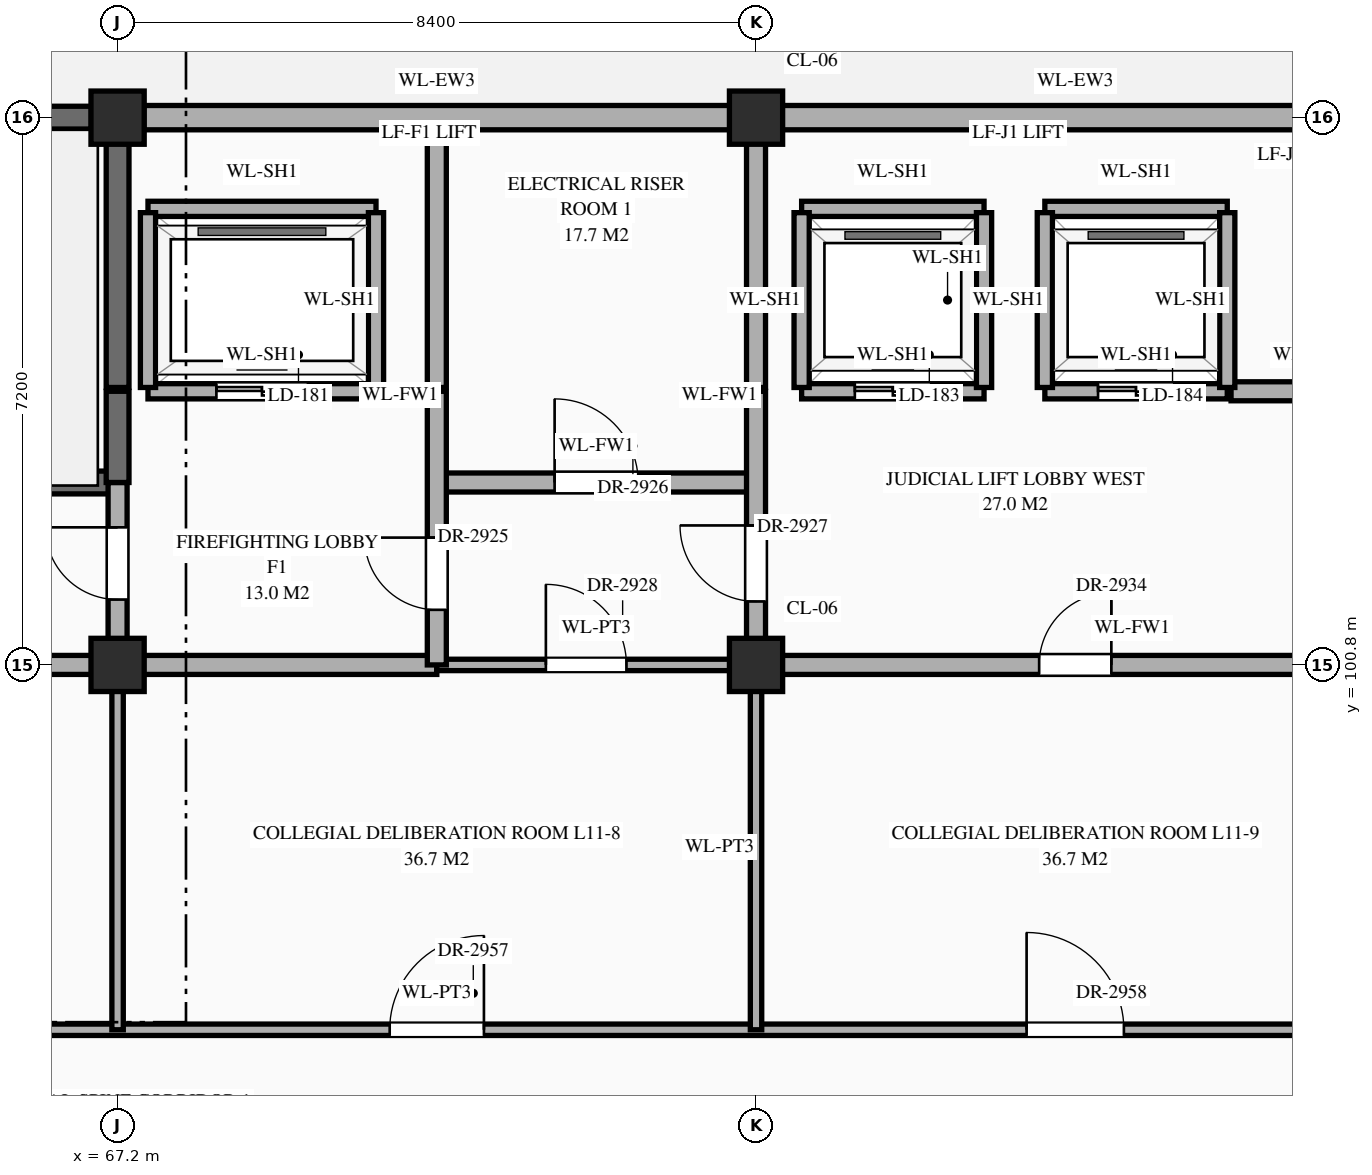
"""IFC4 building model, lengths in metres.
Left out: names, types, materials, properties, quantities, classifications, styles, units other than length and angle.
Written with IfcOpenShell. Run it as: python <this file> out.ifc"""

import sys

from ifc_helpers import new_model, si_unit, direction, frame, frame_2d, origin, origin_2d, place, context, subcontext, project, spatial, rectangle, extrude, element, fill, save


model = new_model("IFC4")
c1 = context("Model", 3, precision=1e-05, world=origin(), true_north=direction((0.0, 1.0)))
c2 = subcontext(c1, "Body", "Model", "MODEL_VIEW")
j1 = project(units=[si_unit("LENGTHUNIT", "METRE"), si_unit("PLANEANGLEUNIT", "RADIAN")], contexts=[c1])
p1 = place(None, origin())
s1 = spatial("IfcSite", under=j1, at=p1, CompositionType="ELEMENT")
p2 = place(p1, origin())
s2 = spatial("IfcBuilding", under=s1, at=p2, CompositionType="ELEMENT")
p3 = place(p2, frame((0.0, 0.0, 47.7)))
s3 = spatial("IfcBuildingStorey", under=s2, at=p3, CompositionType="ELEMENT", Elevation=47.7)
for number, where, z_axis, x_axis in (
    (1, (67.2, 100.8, 0.0), (0.0, 0.0, 1.0), (1.0, 0.0, 0.0)),
    (2, (67.2, 108.0, 0.0), (0.0, 0.0, 1.0), (1.0, 0.0, 0.0)),
    (3, (75.6, 100.8, 0.0), (0.0, 0.0, 1.0), (1.0, 0.0, 0.0)),
    (4, (75.6, 108.0, 0.0), (0.0, 0.0, 1.0), (1.0, 0.0, 0.0)),
):
    element("IfcColumn", number, at=place(p3, frame(where, z_axis=z_axis, x_axis=x_axis)), inside=s3, PredefinedType="COLUMN", context=c2, shape_type="SweptSolid", body=[
        extrude(rectangle(XDim=0.7, YDim=0.7, at=origin_2d()), origin(), (0.0, 0.0, 1.0), 4.2),
    ])
p4 = place(p3, frame((59.145, 108.0, 0.0), z_axis=(0.0, 0.0, 1.0), x_axis=(1.0, 0.0, 0.0)))
e5 = element("IfcWall", 5, at=p4, inside=s3, PredefinedType="SHEAR", context=c2, shape_type="SweptSolid", body=[
    extrude(rectangle(XDim=7.71, YDim=0.3, at=frame_2d((3.855, 0.0))), origin(), (0.0, 0.0, 1.0), 3.96),
])
for number, where, z_axis, x_axis in (
    (6, (67.545, 108.0, 0.0), (0.0, 0.0, 1.0), (1.0, 0.0, 0.0)),
    (7, (75.945, 108.0, 0.0), (0.0, 0.0, 1.0), (1.0, 0.0, 0.0)),
):
    element("IfcWall", number, at=place(p3, frame(where, z_axis=z_axis, x_axis=x_axis)), inside=s3, PredefinedType="STANDARD", context=c2, shape_type="SweptSolid", body=[
        extrude(rectangle(XDim=7.71, YDim=0.32, at=frame_2d((3.855, 0.0))), origin(), (0.0, 0.0, 1.0), 3.31),
    ])
p5 = place(p3, frame((58.8, 96.0, 0.0), z_axis=(0.0, 0.0, 1.0), x_axis=(1.0, 0.0, 0.0)))
e8 = element("IfcWall", 8, at=p5, inside=s3, PredefinedType="STANDARD", context=c2, shape_type="SweptSolid", body=[
    extrude(rectangle(XDim=25.2, YDim=0.15, at=frame_2d((12.6, 0.0))), origin(), (0.0, 0.0, 1.0), 3.96),
])
p6 = place(p5, frame((3.6, 0.0, 0.0)))
e9 = element("IfcOpeningElement", 9, at=p6, cuts=e8, PredefinedType="OPENING", context=c2, shape_type="SweptSolid", body=[
    extrude(rectangle(XDim=1.2, YDim=2.35, at=frame_2d((0.6, 1.175))), frame((0.0, 0.087, 0.0), z_axis=(0.0, -1.0, 0.0), x_axis=(1.0, 0.0, 0.0)), (0.0, 0.0, 1.0), 0.174),
])
p7 = place(p5, frame((11.98, 0.0, 0.0)))
e10 = element("IfcOpeningElement", 10, at=p7, cuts=e8, PredefinedType="OPENING", context=c2, shape_type="SweptSolid", body=[
    extrude(rectangle(XDim=1.24, YDim=2.3, at=frame_2d((0.62, 1.15))), frame((0.0, 0.087, 0.0), z_axis=(0.0, -1.0, 0.0), x_axis=(1.0, 0.0, 0.0)), (0.0, 0.0, 1.0), 0.174),
])
p8 = place(p5, frame((20.36, 0.0, 0.0)))
e11 = element("IfcOpeningElement", 11, at=p8, cuts=e8, PredefinedType="OPENING", context=c2, shape_type="SweptSolid", body=[
    extrude(rectangle(XDim=1.28, YDim=2.35, at=frame_2d((0.64, 1.175))), frame((0.0, 0.087, 0.0), z_axis=(0.0, -1.0, 0.0), x_axis=(1.0, 0.0, 0.0)), (0.0, 0.0, 1.0), 0.174),
])
p9 = place(p3, frame((58.8, 100.8, 0.0), z_axis=(0.0, 0.0, 1.0), x_axis=(1.0, 0.0, 0.0)))
e12 = element("IfcWall", 12, at=p9, inside=s3, PredefinedType="STANDARD", context=c2, shape_type="SweptSolid", body=[
    extrude(rectangle(XDim=12.6, YDim=0.25, at=frame_2d((6.3, 0.0))), origin(), (0.0, 0.0, 1.0), 3.11),
])
p10 = place(p9, frame((3.7, 0.0, 0.0)))
e13 = element("IfcOpeningElement", 13, at=p10, cuts=e12, PredefinedType="OPENING", context=c2, shape_type="SweptSolid", body=[
    extrude(rectangle(XDim=1.0, YDim=2.2, at=frame_2d((0.5, 1.1))), frame((0.0, 0.137, 0.0), z_axis=(0.0, -1.0, 0.0), x_axis=(1.0, 0.0, 0.0)), (0.0, 0.0, 1.0), 0.274),
])
p11 = place(p3, frame((71.4, 100.8, 0.0), z_axis=(0.0, 0.0, 1.0), x_axis=(1.0, 0.0, 0.0)))
e14 = element("IfcWall", 14, at=p11, inside=s3, PredefinedType="STANDARD", context=c2, shape_type="SweptSolid", body=[
    extrude(rectangle(XDim=4.2, YDim=0.15, at=frame_2d((2.1, 0.0))), origin(), (0.0, 0.0, 1.0), 3.11),
])
p12 = place(p11, frame((1.435, 0.0, 0.0)))
e15 = element("IfcOpeningElement", 15, at=p12, cuts=e14, PredefinedType="OPENING", context=c2, shape_type="SweptSolid", body=[
    extrude(rectangle(XDim=1.06, YDim=2.4, at=frame_2d((0.53, 1.2))), frame((0.0, 0.087, 0.0), z_axis=(0.0, -1.0, 0.0), x_axis=(1.0, 0.0, 0.0)), (0.0, 0.0, 1.0), 0.174),
])
p13 = place(p3, frame((75.6, 100.8, 0.0), z_axis=(0.0, 0.0, 1.0), x_axis=(1.0, 0.0, 0.0)))
e16 = element("IfcWall", 16, at=p13, inside=s3, PredefinedType="STANDARD", context=c2, shape_type="SweptSolid", body=[
    extrude(rectangle(XDim=16.8, YDim=0.25, at=frame_2d((8.4, 0.0))), origin(), (0.0, 0.0, 1.0), 3.11),
])
p14 = place(p13, frame((3.725, 0.0, 0.0)))
e17 = element("IfcOpeningElement", 17, at=p14, cuts=e16, PredefinedType="OPENING", context=c2, shape_type="SweptSolid", body=[
    extrude(rectangle(XDim=0.95, YDim=2.15, at=frame_2d((0.475, 1.075))), frame((0.0, 0.137, 0.0), z_axis=(0.0, -1.0, 0.0), x_axis=(1.0, 0.0, 0.0)), (0.0, 0.0, 1.0), 0.274),
])
p15 = place(p13, frame((9.685, 0.0, 0.0)))
e18 = element("IfcOpeningElement", 18, at=p15, cuts=e16, PredefinedType="OPENING", context=c2, shape_type="SweptSolid", body=[
    extrude(rectangle(XDim=1.1, YDim=2.2, at=frame_2d((0.55, 1.1))), frame((0.0, 0.137, 0.0), z_axis=(0.0, -1.0, 0.0), x_axis=(1.0, 0.0, 0.0)), (0.0, 0.0, 1.0), 0.274),
])
p16 = place(p13, frame((12.5, 0.0, 0.0)))
e19 = element("IfcOpeningElement", 19, at=p16, cuts=e16, PredefinedType="OPENING", context=c2, shape_type="SweptSolid", body=[
    extrude(rectangle(XDim=1.0, YDim=2.2, at=frame_2d((0.5, 1.1))), frame((0.0, 0.137, 0.0), z_axis=(0.0, -1.0, 0.0), x_axis=(1.0, 0.0, 0.0)), (0.0, 0.0, 1.0), 0.274),
])
p17 = place(p13, frame((14.89, 0.0, 0.0)))
e20 = element("IfcOpeningElement", 20, at=p17, cuts=e16, PredefinedType="OPENING", context=c2, shape_type="SweptSolid", body=[
    extrude(rectangle(XDim=0.95, YDim=2.15, at=frame_2d((0.475, 1.075))), frame((0.0, 0.137, 0.0), z_axis=(0.0, -1.0, 0.0), x_axis=(1.0, 0.0, 0.0)), (0.0, 0.0, 1.0), 0.274),
])
p18 = place(p3, frame((58.8, 103.2, 0.0), z_axis=(0.0, 0.0, 1.0), x_axis=(1.0, 0.0, 0.0)))
e21 = element("IfcWall", 21, at=p18, inside=s3, PredefinedType="SHEAR", context=c2, shape_type="SweptSolid", body=[
    extrude(rectangle(XDim=8.4, YDim=0.3, at=frame_2d((4.2, 0.0))), origin(), (0.0, 0.0, 1.0), 3.96),
])
p19 = place(p18, frame((0.65, 0.0, 0.0)))
e22 = element("IfcOpeningElement", 22, at=p19, cuts=e21, PredefinedType="OPENING", context=c2, shape_type="SweptSolid", body=[
    extrude(rectangle(XDim=1.1, YDim=2.2, at=frame_2d((0.55, 1.1))), frame((0.0, 0.162, 0.0), z_axis=(0.0, -1.0, 0.0), x_axis=(1.0, 0.0, 0.0)), (0.0, 0.0, 1.0), 0.324),
])
p20 = place(p3, frame((71.4, 103.2, 0.0), z_axis=(0.0, 0.0, 1.0), x_axis=(1.0, 0.0, 0.0)))
e23 = element("IfcWall", 23, at=p20, inside=s3, PredefinedType="STANDARD", context=c2, shape_type="SweptSolid", body=[
    extrude(rectangle(XDim=4.2, YDim=0.25, at=frame_2d((2.1, 0.0))), origin(), (0.0, 0.0, 1.0), 3.96),
])
p21 = place(p20, frame((1.55, 0.0, 0.0)))
e24 = element("IfcOpeningElement", 24, at=p21, cuts=e23, PredefinedType="OPENING", context=c2, shape_type="SweptSolid", body=[
    extrude(rectangle(XDim=1.1, YDim=2.2, at=frame_2d((0.55, 1.1))), frame((0.0, 0.137, 0.0), z_axis=(0.0, -1.0, 0.0), x_axis=(1.0, 0.0, 0.0)), (0.0, 0.0, 1.0), 0.274),
])
p22 = place(p3, frame((67.6, 104.4, 0.0), z_axis=(0.0, 0.0, 1.0), x_axis=(1.0, 0.0, 0.0)))
e25 = element("IfcWall", 25, at=p22, inside=s3, PredefinedType="STANDARD", context=c2, shape_type="SweptSolid", body=[
    extrude(rectangle(XDim=3.0, YDim=0.2, at=frame_2d((1.5, 0.0))), origin(), (0.0, 0.0, 1.0), 3.96),
])
p23 = place(p22, frame((0.9, 0.0, 0.0)))
e26 = element("IfcOpeningElement", 26, at=p23, cuts=e25, PredefinedType="OPENING", context=c2, shape_type="SweptSolid", body=[
    extrude(rectangle(XDim=1.2, YDim=2.15, at=frame_2d((0.6, 1.075))), frame((0.0, 0.112, 0.0), z_axis=(0.0, -1.0, 0.0), x_axis=(1.0, 0.0, 0.0)), (0.0, 0.0, 1.0), 0.224),
])
p24 = place(p3, frame((76.2, 104.4, 0.0), z_axis=(0.0, 0.0, 1.0), x_axis=(1.0, 0.0, 0.0)))
e27 = element("IfcWall", 27, at=p24, inside=s3, PredefinedType="STANDARD", context=c2, shape_type="SweptSolid", body=[
    extrude(rectangle(XDim=2.4, YDim=0.2, at=frame_2d((1.2, 0.0))), origin(), (0.0, 0.0, 1.0), 3.96),
])
p25 = place(p24, frame((0.7, 0.0, 0.0)))
e28 = element("IfcOpeningElement", 28, at=p25, cuts=e27, PredefinedType="OPENING", context=c2, shape_type="SweptSolid", body=[
    extrude(rectangle(XDim=1.0, YDim=2.15, at=frame_2d((0.5, 1.075))), frame((0.0, 0.112, 0.0), z_axis=(0.0, -1.0, 0.0), x_axis=(1.0, 0.0, 0.0)), (0.0, 0.0, 1.0), 0.224),
])
p26 = place(p3, frame((79.4, 104.4, 0.0), z_axis=(0.0, 0.0, 1.0), x_axis=(1.0, 0.0, 0.0)))
e29 = element("IfcWall", 29, at=p26, inside=s3, PredefinedType="STANDARD", context=c2, shape_type="SweptSolid", body=[
    extrude(rectangle(XDim=2.4, YDim=0.2, at=frame_2d((1.2, 0.0))), origin(), (0.0, 0.0, 1.0), 3.96),
])
p27 = place(p26, frame((0.7, 0.0, 0.0)))
e30 = element("IfcOpeningElement", 30, at=p27, cuts=e29, PredefinedType="OPENING", context=c2, shape_type="SweptSolid", body=[
    extrude(rectangle(XDim=1.0, YDim=2.15, at=frame_2d((0.5, 1.075))), frame((0.0, 0.112, 0.0), z_axis=(0.0, -1.0, 0.0), x_axis=(1.0, 0.0, 0.0)), (0.0, 0.0, 1.0), 0.224),
])
p28 = place(p3, frame((81.85, 104.4, 0.0), z_axis=(0.0, 0.0, 1.0), x_axis=(1.0, 0.0, 0.0)))
e31 = element("IfcWall", 31, at=p28, inside=s3, PredefinedType="STANDARD", context=c2, shape_type="SweptSolid", body=[
    extrude(rectangle(XDim=2.1, YDim=0.25, at=frame_2d((1.05, 0.0))), origin(), (0.0, 0.0, 1.0), 3.96),
])
p29 = place(p3, frame((67.6, 106.8, 0.0), z_axis=(0.0, 0.0, 1.0), x_axis=(1.0, 0.0, 0.0)))
e32 = element("IfcWall", 32, at=p29, inside=s3, PredefinedType="STANDARD", context=c2, shape_type="SweptSolid", body=[
    extrude(rectangle(XDim=3.0, YDim=0.2, at=frame_2d((1.5, 0.0))), origin(), (0.0, 0.0, 1.0), 3.96),
])
for number, where, z_axis, x_axis in (
    (33, (76.2, 106.8, 0.0), (0.0, 0.0, 1.0), (1.0, 0.0, 0.0)),
    (34, (79.4, 106.8, 0.0), (0.0, 0.0, 1.0), (1.0, 0.0, 0.0)),
):
    element("IfcWall", number, at=place(p3, frame(where, z_axis=z_axis, x_axis=x_axis)), inside=s3, PredefinedType="STANDARD", context=c2, shape_type="SweptSolid", body=[
        extrude(rectangle(XDim=2.4, YDim=0.2, at=frame_2d((1.2, 0.0))), origin(), (0.0, 0.0, 1.0), 3.96),
    ])
p30 = place(p3, frame((67.2, 96.0, 0.0), z_axis=(0.0, 0.0, 1.0), x_axis=(0.0, 1.0, 0.0)))
e35 = element("IfcWall", 35, at=p30, inside=s3, PredefinedType="STANDARD", context=c2, shape_type="SweptSolid", body=[
    extrude(rectangle(XDim=4.8, YDim=0.15, at=frame_2d((2.4, 0.0))), origin(), (0.0, 0.0, 1.0), 3.21),
])
p31 = place(p3, frame((67.2, 100.8, 0.0), z_axis=(0.0, 0.0, 1.0), x_axis=(0.0, 1.0, 0.0)))
e36 = element("IfcWall", 36, at=p31, inside=s3, PredefinedType="STANDARD", context=c2, shape_type="SweptSolid", body=[
    extrude(rectangle(XDim=2.4, YDim=0.25, at=frame_2d((1.2, 0.0))), origin(), (0.0, 0.0, 1.0), 3.21),
])
p32 = place(p31, frame((0.86, 0.0, 0.0)))
e37 = element("IfcOpeningElement", 37, at=p32, cuts=e36, PredefinedType="OPENING", context=c2, shape_type="SweptSolid", body=[
    extrude(rectangle(XDim=0.95, YDim=2.15, at=frame_2d((0.475, 1.075))), frame((0.0, 0.137, 0.0), z_axis=(0.0, -1.0, 0.0), x_axis=(1.0, 0.0, 0.0)), (0.0, 0.0, 1.0), 0.274),
])
p33 = place(p3, frame((67.2, 103.2, 0.0), z_axis=(0.0, 0.0, 1.0), x_axis=(0.0, 1.0, 0.0)))
e38 = element("IfcWall", 38, at=p33, inside=s3, PredefinedType="SHEAR", context=c2, shape_type="SweptSolid", body=[
    extrude(rectangle(XDim=1.2, YDim=0.3, at=frame_2d((0.6, 0.0))), origin(), (0.0, 0.0, 1.0), 3.96),
])
p34 = place(p3, frame((67.2, 104.45, 0.0), z_axis=(0.0, 0.0, 1.0), x_axis=(0.0, 1.0, 0.0)))
e39 = element("IfcWall", 39, at=p34, inside=s3, PredefinedType="SHEAR", context=c2, shape_type="SweptSolid", body=[
    extrude(rectangle(XDim=3.46, YDim=0.3, at=frame_2d((1.73, 0.0))), origin(), (0.0, 0.0, 1.0), 3.96),
])
for number, where, z_axis, x_axis in (
    (40, (67.6, 104.45, 0.0), (0.0, 0.0, 1.0), (0.0, 1.0, 0.0)),
    (41, (70.6, 104.45, 0.0), (0.0, 0.0, 1.0), (0.0, 1.0, 0.0)),
):
    element("IfcWall", number, at=place(p3, frame(where, z_axis=z_axis, x_axis=x_axis)), inside=s3, PredefinedType="STANDARD", context=c2, shape_type="SweptSolid", body=[
        extrude(rectangle(XDim=2.3, YDim=0.2, at=frame_2d((1.15, 0.0))), origin(), (0.0, 0.0, 1.0), 3.96),
    ])
p35 = place(p3, frame((71.4, 100.8, 0.0), z_axis=(0.0, 0.0, 1.0), x_axis=(0.0, 1.0, 0.0)))
e42 = element("IfcWall", 42, at=p35, inside=s3, PredefinedType="STANDARD", context=c2, shape_type="SweptSolid", body=[
    extrude(rectangle(XDim=3.6, YDim=0.25, at=frame_2d((1.8, 0.0))), origin(), (0.0, 0.0, 1.0), 3.61),
])
p36 = place(p35, frame((0.725, 0.0, 0.0)))
e43 = element("IfcOpeningElement", 43, at=p36, cuts=e42, PredefinedType="OPENING", context=c2, shape_type="SweptSolid", body=[
    extrude(rectangle(XDim=0.95, YDim=2.15, at=frame_2d((0.475, 1.075))), frame((0.0, 0.137, 0.0), z_axis=(0.0, -1.0, 0.0), x_axis=(1.0, 0.0, 0.0)), (0.0, 0.0, 1.0), 0.274),
])
p37 = place(p3, frame((71.4, 104.45, 0.0), z_axis=(0.0, 0.0, 1.0), x_axis=(0.0, 1.0, 0.0)))
e44 = element("IfcWall", 44, at=p37, inside=s3, PredefinedType="STANDARD", context=c2, shape_type="SweptSolid", body=[
    extrude(rectangle(XDim=3.46, YDim=0.25, at=frame_2d((1.73, 0.0))), origin(), (0.0, 0.0, 1.0), 3.61),
])
p38 = place(p3, frame((75.6, 96.0, 0.0), z_axis=(0.0, 0.0, 1.0), x_axis=(0.0, 1.0, 0.0)))
e45 = element("IfcWall", 45, at=p38, inside=s3, PredefinedType="STANDARD", context=c2, shape_type="SweptSolid", body=[
    extrude(rectangle(XDim=4.8, YDim=0.15, at=frame_2d((2.4, 0.0))), origin(), (0.0, 0.0, 1.0), 3.21),
])
p39 = place(p3, frame((75.6, 100.8, 0.0), z_axis=(0.0, 0.0, 1.0), x_axis=(0.0, 1.0, 0.0)))
e46 = element("IfcWall", 46, at=p39, inside=s3, PredefinedType="STANDARD", context=c2, shape_type="SweptSolid", body=[
    extrude(rectangle(XDim=3.6, YDim=0.25, at=frame_2d((1.8, 0.0))), origin(), (0.0, 0.0, 1.0), 3.21),
])
p40 = place(p39, frame((0.835, 0.0, 0.0)))
e47 = element("IfcOpeningElement", 47, at=p40, cuts=e46, PredefinedType="OPENING", context=c2, shape_type="SweptSolid", body=[
    extrude(rectangle(XDim=1.0, YDim=2.2, at=frame_2d((0.5, 1.1))), frame((0.0, 0.137, 0.0), z_axis=(0.0, -1.0, 0.0), x_axis=(1.0, 0.0, 0.0)), (0.0, 0.0, 1.0), 0.274),
])
p41 = place(p3, frame((75.6, 104.45, 0.0), z_axis=(0.0, 0.0, 1.0), x_axis=(0.0, 1.0, 0.0)))
e48 = element("IfcWall", 48, at=p41, inside=s3, PredefinedType="STANDARD", context=c2, shape_type="SweptSolid", body=[
    extrude(rectangle(XDim=3.46, YDim=0.25, at=frame_2d((1.73, 0.0))), origin(), (0.0, 0.0, 1.0), 3.21),
])
for number, where, z_axis, x_axis in (
    (49, (76.2, 104.45, 0.0), (0.0, 0.0, 1.0), (0.0, 1.0, 0.0)),
    (50, (78.6, 104.45, 0.0), (0.0, 0.0, 1.0), (0.0, 1.0, 0.0)),
    (51, (79.4, 104.45, 0.0), (0.0, 0.0, 1.0), (0.0, 1.0, 0.0)),
    (52, (81.8, 104.45, 0.0), (0.0, 0.0, 1.0), (0.0, 1.0, 0.0)),
):
    element("IfcWall", number, at=place(p3, frame(where, z_axis=z_axis, x_axis=x_axis)), inside=s3, PredefinedType="STANDARD", context=c2, shape_type="SweptSolid", body=[
        extrude(rectangle(XDim=2.3, YDim=0.2, at=frame_2d((1.15, 0.0))), origin(), (0.0, 0.0, 1.0), 3.96),
    ])
p42 = place(p23, origin())
e53 = element("IfcDoor", 53, at=p42, inside=s3, OperationType="DOUBLE_DOOR_SLIDING", PredefinedType="DOOR", context=c2, shape_type="SweptSolid", body=[
    extrude(rectangle(XDim=1.2, YDim=2.15, at=frame_2d((0.6, 1.075))), frame((0.0, 0.025, 0.0), z_axis=(0.0, -1.0, 0.0), x_axis=(1.0, 0.0, 0.0)), (0.0, 0.0, 1.0), 0.05),
])
fill(e26, e53)
p43 = place(p25, origin())
e54 = element("IfcDoor", 54, at=p43, inside=s3, OperationType="DOUBLE_DOOR_SLIDING", PredefinedType="DOOR", context=c2, shape_type="SweptSolid", body=[
    extrude(rectangle(XDim=1.0, YDim=2.15, at=frame_2d((0.5, 1.075))), frame((0.0, 0.025, 0.0), z_axis=(0.0, -1.0, 0.0), x_axis=(1.0, 0.0, 0.0)), (0.0, 0.0, 1.0), 0.05),
])
fill(e28, e54)
p44 = place(p27, origin())
e55 = element("IfcDoor", 55, at=p44, inside=s3, OperationType="DOUBLE_DOOR_SLIDING", PredefinedType="DOOR", context=c2, shape_type="SweptSolid", body=[
    extrude(rectangle(XDim=1.0, YDim=2.15, at=frame_2d((0.5, 1.075))), frame((0.0, 0.025, 0.0), z_axis=(0.0, -1.0, 0.0), x_axis=(1.0, 0.0, 0.0)), (0.0, 0.0, 1.0), 0.05),
])
fill(e30, e55)
p45 = place(p32, origin())
e56 = element("IfcDoor", 56, at=p45, inside=s3, OperationType="SINGLE_SWING_RIGHT", PredefinedType="DOOR", context=c2, shape_type="SweptSolid", body=[
    extrude(rectangle(XDim=0.95, YDim=2.15, at=frame_2d((0.475, 1.075))), frame((0.0, 0.025, 0.0), z_axis=(0.0, -1.0, 0.0), x_axis=(1.0, 0.0, 0.0)), (0.0, 0.0, 1.0), 0.05),
])
fill(e37, e56)
p46 = place(p36, origin())
e57 = element("IfcDoor", 57, at=p46, inside=s3, OperationType="SINGLE_SWING_RIGHT", PredefinedType="DOOR", context=c2, shape_type="SweptSolid", body=[
    extrude(rectangle(XDim=0.95, YDim=2.15, at=frame_2d((0.475, 1.075))), frame((0.0, 0.025, 0.0), z_axis=(0.0, -1.0, 0.0), x_axis=(1.0, 0.0, 0.0)), (0.0, 0.0, 1.0), 0.05),
])
fill(e43, e57)
p47 = place(p21, origin())
e58 = element("IfcDoor", 58, at=p47, inside=s3, OperationType="SINGLE_SWING_LEFT", PredefinedType="DOOR", context=c2, shape_type="SweptSolid", body=[
    extrude(rectangle(XDim=1.1, YDim=2.2, at=frame_2d((0.55, 1.1))), frame((0.0, 0.025, 0.0), z_axis=(0.0, -1.0, 0.0), x_axis=(1.0, 0.0, 0.0)), (0.0, 0.0, 1.0), 0.05),
])
fill(e24, e58)
p48 = place(p40, origin())
e59 = element("IfcDoor", 59, at=p48, inside=s3, OperationType="SINGLE_SWING_RIGHT", PredefinedType="DOOR", context=c2, shape_type="SweptSolid", body=[
    extrude(rectangle(XDim=1.0, YDim=2.2, at=frame_2d((0.5, 1.1))), frame((0.0, 0.025, 0.0), z_axis=(0.0, -1.0, 0.0), x_axis=(1.0, 0.0, 0.0)), (0.0, 0.0, 1.0), 0.05),
])
fill(e47, e59)
p49 = place(p12, origin())
e60 = element("IfcDoor", 60, at=p49, inside=s3, OperationType="SINGLE_SWING_LEFT", PredefinedType="DOOR", context=c2, shape_type="SweptSolid", body=[
    extrude(rectangle(XDim=1.06, YDim=2.4, at=frame_2d((0.53, 1.2))), frame((0.0, 0.025, 0.0), z_axis=(0.0, -1.0, 0.0), x_axis=(1.0, 0.0, 0.0)), (0.0, 0.0, 1.0), 0.05),
])
fill(e15, e60)
p50 = place(p14, origin())
e61 = element("IfcDoor", 61, at=p50, inside=s3, OperationType="SINGLE_SWING_RIGHT", PredefinedType="DOOR", context=c2, shape_type="SweptSolid", body=[
    extrude(rectangle(XDim=0.95, YDim=2.15, at=frame_2d((0.475, 1.075))), frame((0.0, 0.025, 0.0), z_axis=(0.0, -1.0, 0.0), x_axis=(1.0, 0.0, 0.0)), (0.0, 0.0, 1.0), 0.05),
])
fill(e17, e61)
p51 = place(p7, origin())
e62 = element("IfcDoor", 62, at=p51, inside=s3, OperationType="SINGLE_SWING_RIGHT", PredefinedType="DOOR", context=c2, shape_type="SweptSolid", body=[
    extrude(rectangle(XDim=1.24, YDim=2.3, at=frame_2d((0.62, 1.15))), frame((0.0, 0.025, 0.0), z_axis=(0.0, -1.0, 0.0), x_axis=(1.0, 0.0, 0.0)), (0.0, 0.0, 1.0), 0.05),
])
fill(e10, e62)
p52 = place(p8, origin())
e63 = element("IfcDoor", 63, at=p52, inside=s3, OperationType="SINGLE_SWING_LEFT", PredefinedType="DOOR", context=c2, shape_type="SweptSolid", body=[
    extrude(rectangle(XDim=1.28, YDim=2.35, at=frame_2d((0.64, 1.175))), frame((0.0, 0.025, 0.0), z_axis=(0.0, -1.0, 0.0), x_axis=(1.0, 0.0, 0.0)), (0.0, 0.0, 1.0), 0.05),
])
fill(e11, e63)
save(model, sys.argv[1])
